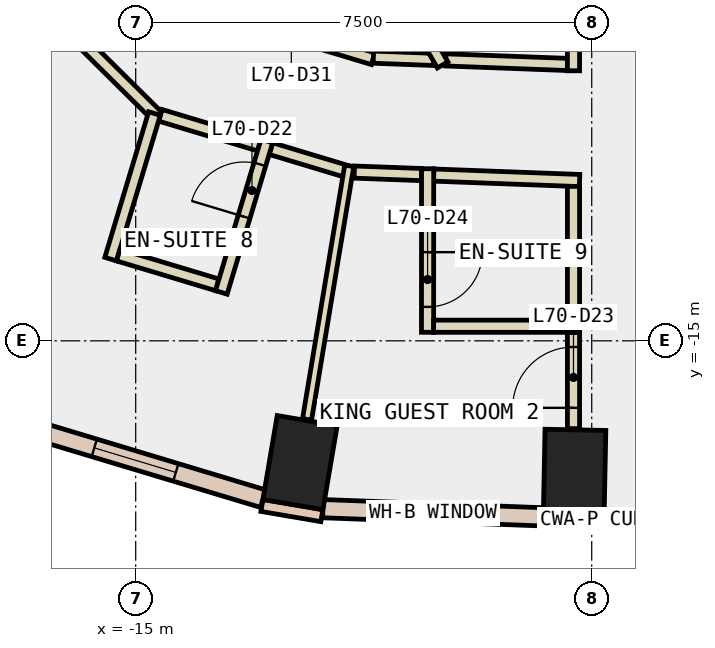
"""IFC4 building model, lengths in metres.
Left out: names, types, materials, properties, quantities, classifications, styles, units other than length and angle.
Written with IfcOpenShell. Run it as: python <this file> out.ifc"""

import sys

from ifc_helpers import new_model, si_unit, direction, frame, frame_2d, origin, origin_2d, place, context, subcontext, project, spatial, rectangle, extrude, element, fill, save


model = new_model("IFC4")
c1 = context("Model", 3, precision=1e-05, world=origin(), true_north=direction((0.0, 1.0)))
c2 = subcontext(c1, "Body", "Model", "MODEL_VIEW")
j1 = project(units=[si_unit("LENGTHUNIT", "METRE"), si_unit("PLANEANGLEUNIT", "RADIAN")], contexts=[c1])
p1 = place(None, origin())
s1 = spatial("IfcSite", under=j1, at=p1, CompositionType="ELEMENT")
p2 = place(p1, origin())
s2 = spatial("IfcBuilding", under=s1, at=p2, CompositionType="ELEMENT")
p3 = place(p2, frame((0.0, 0.0, 300.8)))
s3 = spatial("IfcBuildingStorey", under=s2, at=p3, CompositionType="ELEMENT", Elevation=300.8)
for number, where, z_axis, x_axis in (
    (1, (-12.297, -17.003, -0.34), (0.0, 0.0, 1.0), (-0.986, 0.168, 0.0)),
    (2, (-7.782, -17.164, -0.34), (0.0, 0.0, 1.0), (-1.0, 0.02, 0.0)),
):
    element("IfcColumn", number, at=place(p3, frame(where, z_axis=z_axis, x_axis=x_axis)), inside=s3, PredefinedType="COLUMN", context=c2, shape_type="SweptSolid", body=[
        extrude(rectangle(XDim=1.0, YDim=1.4, at=origin_2d()), origin(), (0.0, 0.0, 1.0), 3.6),
    ])
for number, where, z_axis, x_axis in (
    (3, (-12.924, -17.707, 0.0), (0.0, 0.0, 1.0), (0.986, -0.168, 0.0)),
    (4, (-8.298, -17.954, 0.0), (0.0, 0.0, 1.0), (1.0, -0.02, 0.0)),
):
    element("IfcWall", number, at=place(p3, frame(where, z_axis=z_axis, x_axis=x_axis)), inside=s3, PredefinedType="STANDARD", context=c2, shape_type="SweptSolid", body=[
        extrude(rectangle(XDim=1.0, YDim=0.2, at=frame_2d((0.5, 0.0))), origin(), (0.0, 0.0, 1.0), 3.26),
    ])
p4 = place(p3, frame((-11.92, -17.76, 0.0), z_axis=(0.0, 0.0, 1.0), x_axis=(0.999306787149, -0.037228284377, 0.0)))
e5 = element("IfcWall", 5, at=p4, inside=s3, PredefinedType="STANDARD", context=c2, shape_type="SweptSolid", body=[
    extrude(rectangle(XDim=3.626, YDim=0.3, at=frame_2d((1.813, 0.0))), origin(), (0.0, 0.0, 1.0), 3.26),
])
p5 = place(p4, frame((1.113, 0.0, 0.9)))
e6 = element("IfcOpeningElement", 6, at=p5, cuts=e5, PredefinedType="OPENING", context=c2, shape_type="SweptSolid", body=[
    extrude(rectangle(XDim=1.4, YDim=2.0, at=frame_2d((0.7, 1.0))), frame((0.0, 0.16, 0.0), z_axis=(0.0, -1.0, 0.0), x_axis=(1.0, 0.0, 0.0)), (0.0, 0.0, 1.0), 0.32),
])
p6 = place(p3, frame((-17.117, -16.328, 0.0), z_axis=(0.0, 0.0, 1.0), x_axis=(0.957563190743, -0.288223412884, 0.0)))
e7 = element("IfcWall", 7, at=p6, inside=s3, PredefinedType="STANDARD", context=c2, shape_type="SweptSolid", body=[
    extrude(rectangle(XDim=4.4, YDim=0.3, at=frame_2d((2.2, 0.0))), origin(), (0.0, 0.0, 1.0), 3.26),
])
p7 = place(p6, frame((1.5, 0.0, 0.9)))
e8 = element("IfcOpeningElement", 8, at=p7, cuts=e7, PredefinedType="OPENING", context=c2, shape_type="SweptSolid", body=[
    extrude(rectangle(XDim=1.4, YDim=2.0, at=frame_2d((0.7, 1.0))), frame((0.0, 0.16, 0.0), z_axis=(0.0, -1.0, 0.0), x_axis=(1.0, 0.0, 0.0)), (0.0, 0.0, 1.0), 0.32),
])
p8 = place(p3, frame((-9.902, -10.38, 0.0), z_axis=(0.0, 0.0, 1.0), x_axis=(0.999295503749, -0.037529937222, 0.0)))
e9 = element("IfcWall", 9, at=p8, inside=s3, PredefinedType="PARTITIONING", context=c2, shape_type="SweptSolid", body=[
    extrude(rectangle(XDim=2.004, YDim=0.2, at=frame_2d((1.002, 0.0))), origin(), (0.0, 0.0, 1.0), 3.26),
])
p9 = place(p3, frame((-13.787, -9.55, 0.0), z_axis=(0.0, 0.0, 1.0), x_axis=(0.957493454064, -0.288454997225, 0.0)))
e10 = element("IfcWall", 10, at=p9, inside=s3, PredefinedType="PARTITIONING", context=c2, shape_type="SweptSolid", body=[
    extrude(rectangle(XDim=2.812, YDim=0.2, at=frame_2d((1.406, 0.0))), origin(), (0.0, 0.0, 1.0), 3.26),
])
p10 = place(p9, frame((0.906, 0.0, 0.0)))
e11 = element("IfcOpeningElement", 11, at=p10, cuts=e10, PredefinedType="OPENING", context=c2, shape_type="SweptSolid", body=[
    extrude(rectangle(XDim=1.0, YDim=2.1, at=frame_2d((0.5, 1.05))), frame((0.0, 0.11, 0.0), z_axis=(0.0, -1.0, 0.0), x_axis=(1.0, 0.0, 0.0)), (0.0, 0.0, 1.0), 0.22),
])
p11 = place(p3, frame((-11.091, -10.335, 0.0), z_axis=(0.0, 0.0, 1.0), x_axis=(0.999296807198, -0.037495214686, 0.0)))
e12 = element("IfcWall", 12, at=p11, inside=s3, PredefinedType="PARTITIONING", context=c2, shape_type="SweptSolid", body=[
    extrude(rectangle(XDim=0.99, YDim=0.2, at=frame_2d((0.495, 0.0))), origin(), (0.0, 0.0, 1.0), 3.26),
])
p12 = place(p3, frame((-11.481, -12.229, 0.0), z_axis=(0.0, 0.0, 1.0), x_axis=(-0.957537616046, 0.288308365917, 0.0)))
e13 = element("IfcWall", 13, at=p12, inside=s3, PredefinedType="PARTITIONING", context=c2, shape_type="SweptSolid", body=[
    extrude(rectangle(XDim=1.352, YDim=0.2, at=frame_2d((0.676, 0.0))), origin(), (0.0, 0.0, 1.0), 3.26),
])
p13 = place(p3, frame((-14.62, -11.333, 0.0), z_axis=(0.0, 0.0, 1.0), x_axis=(-0.710808598142, 0.703385482369, 0.0)))
e14 = element("IfcWall", 14, at=p13, inside=s3, PredefinedType="PARTITIONING", context=c2, shape_type="SweptSolid", body=[
    extrude(rectangle(XDim=2.697, YDim=0.2, at=frame_2d((1.349, 0.0))), origin(), (0.0, 0.0, 1.0), 3.26),
])
p14 = place(p3, frame((-12.968, -11.781, 0.0), z_axis=(0.0, 0.0, 1.0), x_axis=(-0.957517271828, 0.288375925054, 0.0)))
e15 = element("IfcWall", 15, at=p14, inside=s3, PredefinedType="PARTITIONING", context=c2, shape_type="SweptSolid", body=[
    extrude(rectangle(XDim=1.699, YDim=0.2, at=frame_2d((0.85, 0.0))), origin(), (0.0, 0.0, 1.0), 3.26),
])
p15 = place(p3, frame((-10.299, -12.266, 0.0), z_axis=(0.0, 0.0, 1.0), x_axis=(-0.999313019426, 0.03706061529, 0.0)))
e16 = element("IfcWall", 16, at=p15, inside=s3, PredefinedType="PARTITIONING", context=c2, shape_type="SweptSolid", body=[
    extrude(rectangle(XDim=1.107, YDim=0.2, at=frame_2d((0.553, 0.0))), origin(), (0.0, 0.0, 1.0), 3.26),
])
p16 = place(p3, frame((-7.7, -12.364, 0.0), z_axis=(0.0, 0.0, 1.0), x_axis=(-0.999295758095, 0.037523164215, 0.0)))
e17 = element("IfcWall", 17, at=p16, inside=s3, PredefinedType="PARTITIONING", context=c2, shape_type="SweptSolid", body=[
    extrude(rectangle(XDim=2.401, YDim=0.2, at=frame_2d((1.2, 0.0))), origin(), (0.0, 0.0, 1.0), 3.26),
])
p17 = place(p3, frame((-7.8, -10.559, 0.0), z_axis=(0.0, 0.0, 1.0), x_axis=(0.0, 1.0, 0.0)))
e18 = element("IfcWall", 18, at=p17, inside=s3, PredefinedType="PARTITIONING", context=c2, shape_type="SweptSolid", body=[
    extrude(rectangle(XDim=4.66, YDim=0.2, at=frame_2d((2.33, 0.0))), origin(), (0.0, 0.0, 1.0), 3.26),
])
p18 = place(p17, frame((1.83, 0.0, 0.0)))
e19 = element("IfcOpeningElement", 19, at=p18, cuts=e18, PredefinedType="OPENING", context=c2, shape_type="SweptSolid", body=[
    extrude(rectangle(XDim=1.0, YDim=2.1, at=frame_2d((0.5, 1.05))), frame((0.0, 0.11, 0.0), z_axis=(0.0, -1.0, 0.0), x_axis=(1.0, 0.0, 0.0)), (0.0, 0.0, 1.0), 0.22),
])
p19 = place(p3, frame((-7.8, -16.444, 0.0), z_axis=(0.0, 0.0, 1.0), x_axis=(0.0, 1.0, 0.0)))
e20 = element("IfcWall", 20, at=p19, inside=s3, PredefinedType="PARTITIONING", context=c2, shape_type="SweptSolid", body=[
    extrude(rectangle(XDim=1.584, YDim=0.2, at=frame_2d((0.792, 0.0))), origin(), (0.0, 0.0, 1.0), 3.26),
])
p20 = place(p19, frame((0.342, 0.0, 0.0)))
e21 = element("IfcOpeningElement", 21, at=p20, cuts=e20, PredefinedType="OPENING", context=c2, shape_type="SweptSolid", body=[
    extrude(rectangle(XDim=1.0, YDim=2.1, at=frame_2d((0.5, 1.05))), frame((0.0, 0.11, 0.0), z_axis=(0.0, -1.0, 0.0), x_axis=(1.0, 0.0, 0.0)), (0.0, 0.0, 1.0), 0.22),
])
p21 = place(p3, frame((-7.8, -14.86, 0.0), z_axis=(0.0, 0.0, 1.0), x_axis=(0.0, 1.0, 0.0)))
e22 = element("IfcWall", 22, at=p21, inside=s3, PredefinedType="PARTITIONING", context=c2, shape_type="SweptSolid", body=[
    extrude(rectangle(XDim=2.4, YDim=0.2, at=frame_2d((1.2, 0.0))), origin(), (0.0, 0.0, 1.0), 3.26),
])
p22 = place(p3, frame((-9.952, -10.463, 0.0), z_axis=(0.0, 0.0, 1.0), x_axis=(-0.499837150608, 0.866119404512, 0.0)))
e23 = element("IfcWall", 23, at=p22, inside=s3, PredefinedType="PARTITIONING", context=c2, shape_type="SweptSolid", body=[
    extrude(rectangle(XDim=3.685, YDim=0.2, at=frame_2d((1.843, 0.0))), origin(), (0.0, 0.0, 1.0), 3.26),
])
p23 = place(p3, frame((-14.691, -11.262, 0.0), z_axis=(0.0, 0.0, 1.0), x_axis=(-0.288440595492, -0.95749779262, 0.0)))
e24 = element("IfcWall", 24, at=p23, inside=s3, PredefinedType="PARTITIONING", context=c2, shape_type="SweptSolid", body=[
    extrude(rectangle(XDim=2.5, YDim=0.2, at=frame_2d((1.25, 0.0))), origin(), (0.0, 0.0, 1.0), 3.26),
])
p24 = place(p3, frame((-15.287, -13.59, 0.0), z_axis=(0.0, 0.0, 1.0), x_axis=(0.957735328181, -0.287650901536, 0.0)))
e25 = element("IfcWall", 25, at=p24, inside=s3, PredefinedType="PARTITIONING", context=c2, shape_type="SweptSolid", body=[
    extrude(rectangle(XDim=1.7, YDim=0.2, at=frame_2d((0.85, 0.0))), origin(), (0.0, 0.0, 1.0), 3.26),
])
p25 = place(p3, frame((-13.592, -14.204, 0.0), z_axis=(0.0, 0.0, 1.0), x_axis=(0.288062768188, 0.95761152958, 0.0)))
e26 = element("IfcWall", 26, at=p25, inside=s3, PredefinedType="PARTITIONING", context=c2, shape_type="SweptSolid", body=[
    extrude(rectangle(XDim=2.6, YDim=0.2, at=frame_2d((1.3, 0.0))), origin(), (0.0, 0.0, 1.0), 3.26),
])
p26 = place(p25, frame((1.3, 0.0, 0.0)))
e27 = element("IfcOpeningElement", 27, at=p26, cuts=e26, PredefinedType="OPENING", context=c2, shape_type="SweptSolid", body=[
    extrude(rectangle(XDim=0.9, YDim=2.1, at=frame_2d((0.45, 1.05))), frame((0.0, 0.11, 0.0), z_axis=(0.0, -1.0, 0.0), x_axis=(1.0, 0.0, 0.0)), (0.0, 0.0, 1.0), 0.22),
])
p27 = place(p3, frame((-11.488, -12.123, 0.0), z_axis=(0.0, 0.0, 1.0), x_axis=(-0.164174159643, -0.986431368776, 0.0)))
e28 = element("IfcWall", 28, at=p27, inside=s3, PredefinedType="PARTITIONING", context=c2, shape_type="SweptSolid", body=[
    extrude(rectangle(XDim=4.226, YDim=0.15, at=frame_2d((2.113, 0.0))), origin(), (0.0, 0.0, 1.0), 3.26),
])
p28 = place(p3, frame((-10.199, -12.17, 0.0), z_axis=(0.0, 0.0, 1.0), x_axis=(-0.000363009324, -0.999999934112, 0.0)))
e29 = element("IfcWall", 29, at=p28, inside=s3, PredefinedType="PARTITIONING", context=c2, shape_type="SweptSolid", body=[
    extrude(rectangle(XDim=2.69, YDim=0.2, at=frame_2d((1.345, 0.0))), origin(), (0.0, 0.0, 1.0), 3.26),
])
p29 = place(p28, frame((1.372, 0.0, 0.0)))
e30 = element("IfcOpeningElement", 30, at=p29, cuts=e29, PredefinedType="OPENING", context=c2, shape_type="SweptSolid", body=[
    extrude(rectangle(XDim=0.9, YDim=2.1, at=frame_2d((0.45, 1.05))), frame((0.0, 0.11, 0.0), z_axis=(0.0, -1.0, 0.0), x_axis=(1.0, 0.0, 0.0)), (0.0, 0.0, 1.0), 0.22),
])
p30 = place(p3, frame((-10.1, -14.76, 0.0), z_axis=(0.0, 0.0, 1.0), x_axis=(1.0, 0.0, 0.0)))
e31 = element("IfcWall", 31, at=p30, inside=s3, PredefinedType="PARTITIONING", context=c2, shape_type="SweptSolid", body=[
    extrude(rectangle(XDim=2.3, YDim=0.2, at=frame_2d((1.15, 0.0))), origin(), (0.0, 0.0, 1.0), 3.26),
])
p31 = place(p5, origin())
e32 = element("IfcWindow", 32, at=p31, inside=s3, PartitioningType="SINGLE_PANEL", PredefinedType="WINDOW", context=c2, shape_type="SweptSolid", body=[
    extrude(rectangle(XDim=1.4, YDim=2.0, at=frame_2d((0.7, 1.0))), frame((0.0, 0.03, 0.0), z_axis=(0.0, -1.0, 0.0), x_axis=(1.0, 0.0, 0.0)), (0.0, 0.0, 1.0), 0.06),
])
fill(e6, e32)
p32 = place(p7, origin())
e33 = element("IfcWindow", 33, at=p32, inside=s3, PartitioningType="SINGLE_PANEL", PredefinedType="WINDOW", context=c2, shape_type="SweptSolid", body=[
    extrude(rectangle(XDim=1.4, YDim=2.0, at=frame_2d((0.7, 1.0))), frame((0.0, 0.03, 0.0), z_axis=(0.0, -1.0, 0.0), x_axis=(1.0, 0.0, 0.0)), (0.0, 0.0, 1.0), 0.06),
])
fill(e8, e33)
p33 = place(p26, origin())
e34 = element("IfcDoor", 34, at=p33, inside=s3, OperationType="SINGLE_SWING_RIGHT", PredefinedType="DOOR", context=c2, shape_type="SweptSolid", body=[
    extrude(rectangle(XDim=0.9, YDim=2.1, at=frame_2d((0.45, 1.05))), frame((0.0, 0.025, 0.0), z_axis=(0.0, -1.0, 0.0), x_axis=(1.0, 0.0, 0.0)), (0.0, 0.0, 1.0), 0.05),
])
fill(e27, e34)
p34 = place(p20, origin())
e35 = element("IfcDoor", 35, at=p34, inside=s3, OperationType="SINGLE_SWING_RIGHT", PredefinedType="DOOR", context=c2, shape_type="SweptSolid", body=[
    extrude(rectangle(XDim=1.0, YDim=2.1, at=frame_2d((0.5, 1.05))), frame((0.0, 0.025, 0.0), z_axis=(0.0, -1.0, 0.0), x_axis=(1.0, 0.0, 0.0)), (0.0, 0.0, 1.0), 0.05),
])
fill(e21, e35)
p35 = place(p29, origin())
e36 = element("IfcDoor", 36, at=p35, inside=s3, OperationType="SINGLE_SWING_RIGHT", PredefinedType="DOOR", context=c2, shape_type="SweptSolid", body=[
    extrude(rectangle(XDim=0.9, YDim=2.1, at=frame_2d((0.45, 1.05))), frame((0.0, 0.025, 0.0), z_axis=(0.0, -1.0, 0.0), x_axis=(1.0, 0.0, 0.0)), (0.0, 0.0, 1.0), 0.05),
])
fill(e30, e36)
save(model, sys.argv[1])
